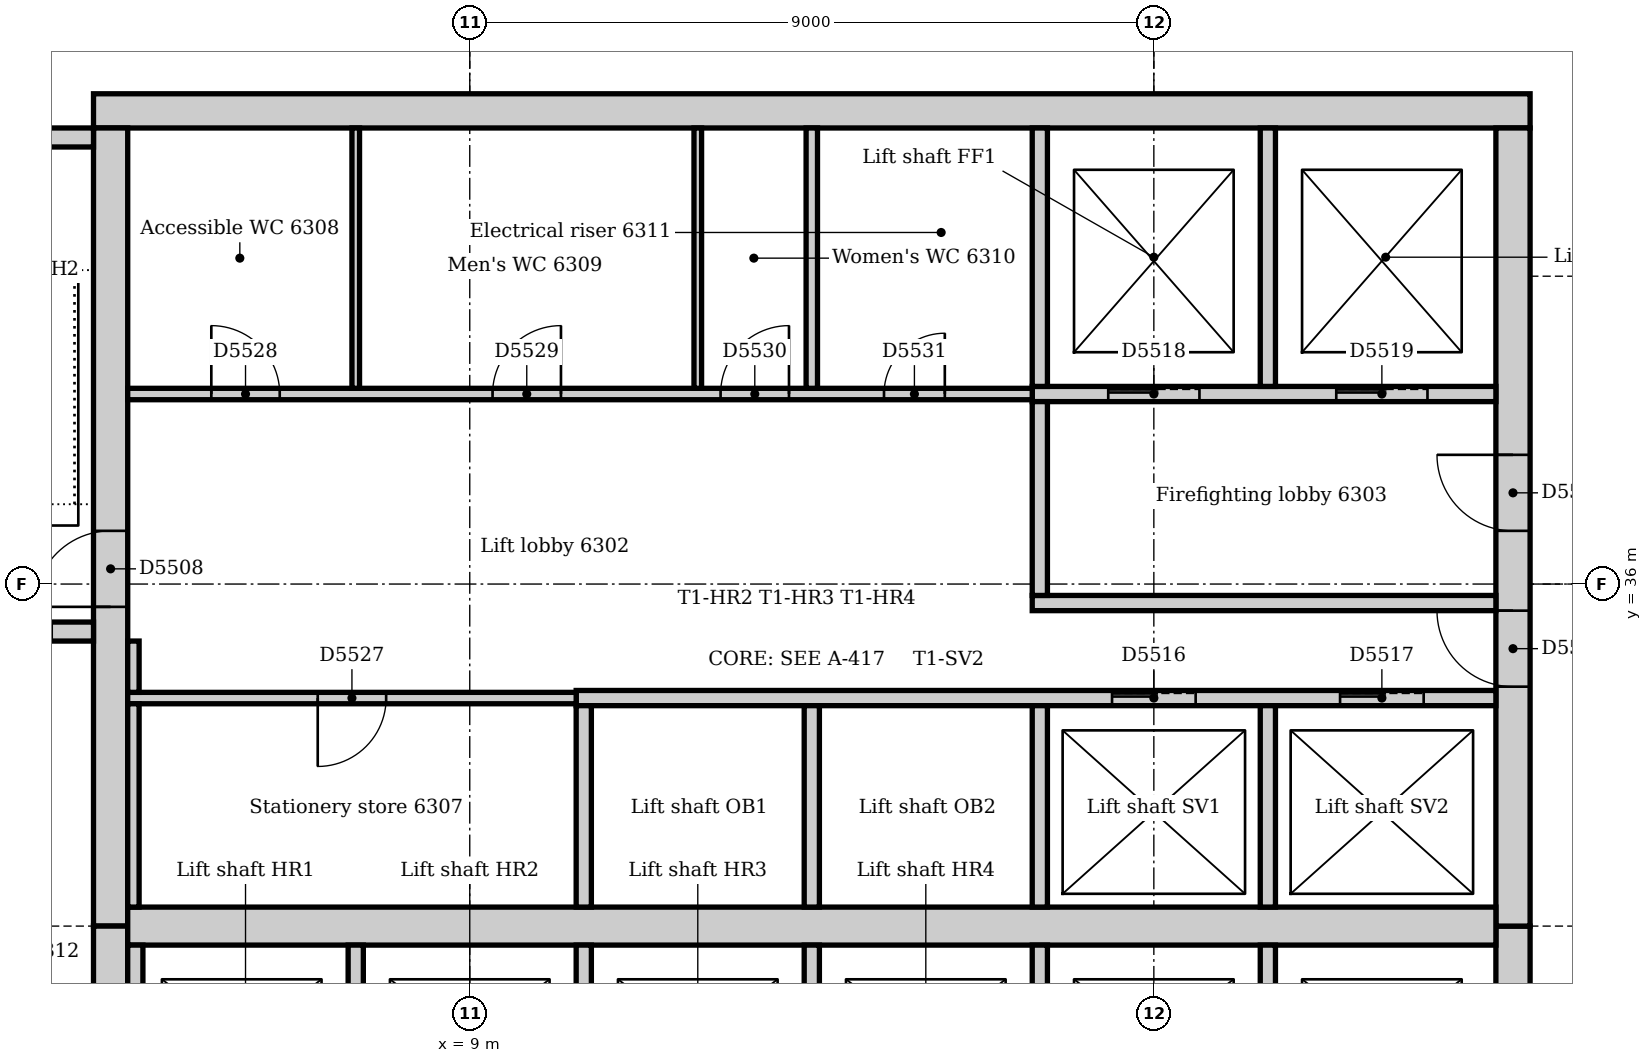
"""IFC4 building model, lengths in metres.
Left out: names, types, materials, properties, quantities, classifications, styles, units other than length and angle.
Written with IfcOpenShell. Run it as: python <this file> out.ifc"""

import sys

from ifc_helpers import new_model, si_unit, direction, frame, frame_2d, origin, place, context, subcontext, project, spatial, rectangle, extrude, element, fill, save


model = new_model("IFC4")
c1 = context("Model", 3, precision=1e-05, world=origin(), true_north=direction((0.0, 1.0)))
c2 = subcontext(c1, "Body", "Model", "MODEL_VIEW")
j1 = project(units=[si_unit("LENGTHUNIT", "METRE"), si_unit("PLANEANGLEUNIT", "RADIAN")], contexts=[c1])
p1 = place(None, origin())
s1 = spatial("IfcSite", under=j1, at=p1, CompositionType="ELEMENT")
p2 = place(p1, origin())
s2 = spatial("IfcBuilding", under=s1, at=p2, CompositionType="ELEMENT")
p3 = place(p2, frame((0.0, 0.0, 263.0)))
s3 = spatial("IfcBuildingStorey", under=s2, at=p3, CompositionType="ELEMENT", Elevation=263.0)
p4 = place(p3, frame((22.95, 42.225, 0.0), z_axis=(0.0, 0.0, 1.0), x_axis=(-1.0, 0.0, 0.0)))
e1 = element("IfcWall", 1, at=p4, inside=s3, PredefinedType="SOLIDWALL", context=c2, shape_type="SweptSolid", body=[
    extrude(rectangle(XDim=18.9, YDim=0.45, at=frame_2d((9.45, 0.0))), origin(), (0.0, 0.0, 1.0), 4.0),
])
p5 = place(p3, frame((22.725, 21.0, 0.0), z_axis=(0.0, 0.0, 1.0), x_axis=(0.0, 1.0, 0.0)))
e2 = element("IfcWall", 2, at=p5, inside=s3, PredefinedType="SOLIDWALL", context=c2, shape_type="SweptSolid", body=[
    extrude(rectangle(XDim=10.5, YDim=0.45, at=frame_2d((5.25, 0.0))), origin(), (0.0, 0.0, 1.0), 4.0),
])
p6 = place(p5, frame((4.35, 0.0, 0.0)))
e3 = element("IfcOpeningElement", 3, at=p6, cuts=e2, PredefinedType="OPENING", context=c2, shape_type="SweptSolid", body=[
    extrude(rectangle(XDim=1.8, YDim=2.1, at=frame_2d((0.9, 1.05))), frame((0.0, 0.235, 0.0), z_axis=(0.0, -1.0, 0.0), x_axis=(1.0, 0.0, 0.0)), (0.0, 0.0, 1.0), 0.47),
])
p7 = place(p3, frame((22.725, 31.5, 0.0), z_axis=(0.0, 0.0, 1.0), x_axis=(0.0, 1.0, 0.0)))
e4 = element("IfcWall", 4, at=p7, inside=s3, PredefinedType="SOLIDWALL", context=c2, shape_type="SweptSolid", body=[
    extrude(rectangle(XDim=10.5, YDim=0.45, at=frame_2d((5.25, 0.0))), origin(), (0.0, 0.0, 1.0), 4.0),
])
p8 = place(p7, frame((3.15, 0.0, 0.0)))
e5 = element("IfcOpeningElement", 5, at=p8, cuts=e4, PredefinedType="OPENING", context=c2, shape_type="SweptSolid", body=[
    extrude(rectangle(XDim=1.0, YDim=2.1, at=frame_2d((0.5, 1.05))), frame((0.0, 0.235, 0.0), z_axis=(0.0, -1.0, 0.0), x_axis=(1.0, 0.0, 0.0)), (0.0, 0.0, 1.0), 0.47),
])
p9 = place(p7, frame((5.2, 0.0, 0.0)))
e6 = element("IfcOpeningElement", 6, at=p9, cuts=e4, PredefinedType="OPENING", context=c2, shape_type="SweptSolid", body=[
    extrude(rectangle(XDim=1.0, YDim=2.1, at=frame_2d((0.5, 1.05))), frame((0.0, 0.235, 0.0), z_axis=(0.0, -1.0, 0.0), x_axis=(1.0, 0.0, 0.0)), (0.0, 0.0, 1.0), 0.47),
])
p10 = place(p3, frame((4.275, 42.0, 0.0), z_axis=(0.0, 0.0, 1.0), x_axis=(0.0, -1.0, 0.0)))
e7 = element("IfcWall", 7, at=p10, inside=s3, PredefinedType="SOLIDWALL", context=c2, shape_type="SweptSolid", body=[
    extrude(rectangle(XDim=10.5, YDim=0.45, at=frame_2d((5.25, 0.0))), origin(), (0.0, 0.0, 1.0), 4.0),
])
p11 = place(p10, frame((5.3, 0.0, 0.0)))
e8 = element("IfcOpeningElement", 8, at=p11, cuts=e7, PredefinedType="OPENING", context=c2, shape_type="SweptSolid", body=[
    extrude(rectangle(XDim=1.0, YDim=2.1, at=frame_2d((0.5, 1.05))), frame((0.0, 0.235, 0.0), z_axis=(0.0, -1.0, 0.0), x_axis=(1.0, 0.0, 0.0)), (0.0, 0.0, 1.0), 0.47),
])
p12 = place(p3, frame((4.275, 31.5, 0.0), z_axis=(0.0, 0.0, 1.0), x_axis=(0.0, -1.0, 0.0)))
e9 = element("IfcWall", 9, at=p12, inside=s3, PredefinedType="SOLIDWALL", context=c2, shape_type="SweptSolid", body=[
    extrude(rectangle(XDim=10.5, YDim=0.45, at=frame_2d((5.25, 0.0))), origin(), (0.0, 0.0, 1.0), 4.0),
])
p13 = place(p12, frame((4.25, 0.0, 0.0)))
e10 = element("IfcOpeningElement", 10, at=p13, cuts=e9, PredefinedType="OPENING", context=c2, shape_type="SweptSolid", body=[
    extrude(rectangle(XDim=1.0, YDim=2.1, at=frame_2d((0.5, 1.05))), frame((0.0, 0.235, 0.0), z_axis=(0.0, -1.0, 0.0), x_axis=(1.0, 0.0, 0.0)), (0.0, 0.0, 1.0), 0.47),
])
p14 = place(p3, frame((4.5, 31.5, 0.0), z_axis=(0.0, 0.0, 1.0), x_axis=(1.0, 0.0, 0.0)))
e11 = element("IfcWall", 11, at=p14, inside=s3, PredefinedType="SOLIDWALL", context=c2, shape_type="SweptSolid", body=[
    extrude(rectangle(XDim=18.0, YDim=0.5, at=frame_2d((9.0, 0.0))), origin(), (0.0, 0.0, 1.0), 4.0),
])
p15 = place(p3, frame((0.36, 35.375, 0.0), z_axis=(0.0, 0.0, 1.0), x_axis=(1.0, 0.0, 0.0)))
e12 = element("IfcWall", 12, at=p15, inside=s3, PredefinedType="SOLIDWALL", context=c2, shape_type="SweptSolid", body=[
    extrude(rectangle(XDim=3.69, YDim=0.25, at=frame_2d((1.845, 0.0))), origin(), (0.0, 0.0, 1.0), 4.0),
])
p16 = place(p15, frame((2.14, 0.0, 0.0)))
e13 = element("IfcOpeningElement", 13, at=p16, cuts=e12, PredefinedType="OPENING", context=c2, shape_type="SweptSolid", body=[
    extrude(rectangle(XDim=1.0, YDim=2.1, at=frame_2d((0.5, 1.05))), frame((0.0, 0.135, 0.0), z_axis=(0.0, -1.0, 0.0), x_axis=(1.0, 0.0, 0.0)), (0.0, 0.0, 1.0), 0.27),
])
p17 = place(p3, frame((4.05, 41.875, 0.0), z_axis=(0.0, 0.0, 1.0), x_axis=(-1.0, 0.0, 0.0)))
e14 = element("IfcWall", 14, at=p17, inside=s3, PredefinedType="SOLIDWALL", context=c2, shape_type="SweptSolid", body=[
    extrude(rectangle(XDim=3.69, YDim=0.25, at=frame_2d((1.845, 0.0))), origin(), (0.0, 0.0, 1.0), 4.0),
])
p18 = place(p3, frame((16.4, 35.75, 0.0), z_axis=(0.0, 0.0, 1.0), x_axis=(1.0, 0.0, 0.0)))
e15 = element("IfcWall", 15, at=p18, inside=s3, PredefinedType="PARTITIONING", context=c2, shape_type="SweptSolid", body=[
    extrude(rectangle(XDim=6.1, YDim=0.2, at=frame_2d((3.05, 0.0))), origin(), (0.0, 0.0, 1.0), 3.85),
])
p19 = place(p3, frame((16.4, 38.5, 0.0), z_axis=(0.0, 0.0, 1.0), x_axis=(1.0, 0.0, 0.0)))
e16 = element("IfcWall", 16, at=p19, inside=s3, PredefinedType="PARTITIONING", context=c2, shape_type="SweptSolid", body=[
    extrude(rectangle(XDim=6.1, YDim=0.2, at=frame_2d((3.05, 0.0))), origin(), (0.0, 0.0, 1.0), 3.85),
])
p20 = place(p19, frame((1.0, 0.0, 0.0)))
e17 = element("IfcOpeningElement", 17, at=p20, cuts=e16, PredefinedType="OPENING", context=c2, shape_type="SweptSolid", body=[
    extrude(rectangle(XDim=1.2, YDim=2.1, at=frame_2d((0.6, 1.05))), frame((0.0, 0.11, 0.0), z_axis=(0.0, -1.0, 0.0), x_axis=(1.0, 0.0, 0.0)), (0.0, 0.0, 1.0), 0.22),
])
p21 = place(p19, frame((4.0, 0.0, 0.0)))
e18 = element("IfcOpeningElement", 18, at=p21, cuts=e16, PredefinedType="OPENING", context=c2, shape_type="SweptSolid", body=[
    extrude(rectangle(XDim=1.2, YDim=2.1, at=frame_2d((0.6, 1.05))), frame((0.0, 0.11, 0.0), z_axis=(0.0, -1.0, 0.0), x_axis=(1.0, 0.0, 0.0)), (0.0, 0.0, 1.0), 0.22),
])
p22 = place(p3, frame((16.5, 35.85, 0.0), z_axis=(0.0, 0.0, 1.0), x_axis=(0.0, 1.0, 0.0)))
e19 = element("IfcWall", 19, at=p22, inside=s3, PredefinedType="PARTITIONING", context=c2, shape_type="SweptSolid", body=[
    extrude(rectangle(XDim=2.55, YDim=0.2, at=frame_2d((1.275, 0.0))), origin(), (0.0, 0.0, 1.0), 3.85),
])
p23 = place(p3, frame((10.4, 34.5, 0.0), z_axis=(0.0, 0.0, 1.0), x_axis=(1.0, 0.0, 0.0)))
e20 = element("IfcWall", 20, at=p23, inside=s3, PredefinedType="PARTITIONING", context=c2, shape_type="SweptSolid", body=[
    extrude(rectangle(XDim=12.1, YDim=0.2, at=frame_2d((6.05, 0.0))), origin(), (0.0, 0.0, 1.0), 3.85),
])
p24 = place(p23, frame((7.05, 0.0, 0.0)))
e21 = element("IfcOpeningElement", 21, at=p24, cuts=e20, PredefinedType="OPENING", context=c2, shape_type="SweptSolid", body=[
    extrude(rectangle(XDim=1.1, YDim=2.1, at=frame_2d((0.55, 1.05))), frame((0.0, 0.11, 0.0), z_axis=(0.0, -1.0, 0.0), x_axis=(1.0, 0.0, 0.0)), (0.0, 0.0, 1.0), 0.22),
])
p25 = place(p23, frame((10.05, 0.0, 0.0)))
e22 = element("IfcOpeningElement", 22, at=p25, cuts=e20, PredefinedType="OPENING", context=c2, shape_type="SweptSolid", body=[
    extrude(rectangle(XDim=1.1, YDim=2.1, at=frame_2d((0.55, 1.05))), frame((0.0, 0.11, 0.0), z_axis=(0.0, -1.0, 0.0), x_axis=(1.0, 0.0, 0.0)), (0.0, 0.0, 1.0), 0.22),
])
for number, where, z_axis, x_axis in (
    (23, (10.5, 28.6, 0.0), (0.0, 0.0, 1.0), (0.0, 1.0, 0.0)),
    (24, (10.5, 31.75, 0.0), (0.0, 0.0, 1.0), (0.0, 1.0, 0.0)),
    (25, (13.5, 28.6, 0.0), (0.0, 0.0, 1.0), (0.0, 1.0, 0.0)),
    (26, (13.5, 31.75, 0.0), (0.0, 0.0, 1.0), (0.0, 1.0, 0.0)),
    (27, (16.5, 28.6, 0.0), (0.0, 0.0, 1.0), (0.0, 1.0, 0.0)),
    (28, (16.5, 31.75, 0.0), (0.0, 0.0, 1.0), (0.0, 1.0, 0.0)),
    (29, (19.5, 28.6, 0.0), (0.0, 0.0, 1.0), (0.0, 1.0, 0.0)),
    (30, (19.5, 31.75, 0.0), (0.0, 0.0, 1.0), (0.0, 1.0, 0.0)),
):
    element("IfcWall", number, at=place(p3, frame(where, z_axis=z_axis, x_axis=x_axis)), inside=s3, PredefinedType="PARTITIONING", context=c2, shape_type="SweptSolid", body=[
        extrude(rectangle(XDim=2.65, YDim=0.2, at=frame_2d((1.325, 0.0))), origin(), (0.0, 0.0, 1.0), 3.85),
    ])
for number, where, z_axis, x_axis in (
    (31, (16.5, 38.6, 0.0), (0.0, 0.0, 1.0), (0.0, 1.0, 0.0)),
    (32, (19.5, 38.6, 0.0), (0.0, 0.0, 1.0), (0.0, 1.0, 0.0)),
):
    element("IfcWall", number, at=place(p3, frame(where, z_axis=z_axis, x_axis=x_axis)), inside=s3, PredefinedType="PARTITIONING", context=c2, shape_type="SweptSolid", body=[
        extrude(rectangle(XDim=3.4, YDim=0.2, at=frame_2d((1.7, 0.0))), origin(), (0.0, 0.0, 1.0), 3.85),
    ])
for number, where, z_axis, x_axis in (
    (33, (4.6, 28.6, 0.0), (0.0, 0.0, 1.0), (0.0, 1.0, 0.0)),
    (34, (7.5, 28.6, 0.0), (0.0, 0.0, 1.0), (0.0, 1.0, 0.0)),
):
    element("IfcWall", number, at=place(p3, frame(where, z_axis=z_axis, x_axis=x_axis)), inside=s3, PredefinedType="PARTITIONING", context=c2, shape_type="SweptSolid", body=[
        extrude(rectangle(XDim=2.65, YDim=0.2, at=frame_2d((1.325, 0.0))), origin(), (0.0, 0.0, 1.0), 3.85),
    ])
p26 = place(p3, frame((4.5, 38.5, 0.0), z_axis=(0.0, 0.0, 1.0), x_axis=(1.0, 0.0, 0.0)))
e35 = element("IfcWall", 35, at=p26, inside=s3, PredefinedType="PARTITIONING", context=c2, shape_type="SweptSolid", body=[
    extrude(rectangle(XDim=11.9, YDim=0.15, at=frame_2d((5.95, 0.0))), origin(), (0.0, 0.0, 1.0), 3.85),
])
p27 = place(p26, frame((1.1, 0.0, 0.0)))
e36 = element("IfcOpeningElement", 36, at=p27, cuts=e35, PredefinedType="OPENING", context=c2, shape_type="SweptSolid", body=[
    extrude(rectangle(XDim=0.9, YDim=2.1, at=frame_2d((0.45, 1.05))), frame((0.0, 0.085, 0.0), z_axis=(0.0, -1.0, 0.0), x_axis=(1.0, 0.0, 0.0)), (0.0, 0.0, 1.0), 0.17),
])
p28 = place(p26, frame((4.8, 0.0, 0.0)))
e37 = element("IfcOpeningElement", 37, at=p28, cuts=e35, PredefinedType="OPENING", context=c2, shape_type="SweptSolid", body=[
    extrude(rectangle(XDim=0.9, YDim=2.1, at=frame_2d((0.45, 1.05))), frame((0.0, 0.085, 0.0), z_axis=(0.0, -1.0, 0.0), x_axis=(1.0, 0.0, 0.0)), (0.0, 0.0, 1.0), 0.17),
])
p29 = place(p26, frame((7.8, 0.0, 0.0)))
e38 = element("IfcOpeningElement", 38, at=p29, cuts=e35, PredefinedType="OPENING", context=c2, shape_type="SweptSolid", body=[
    extrude(rectangle(XDim=0.9, YDim=2.1, at=frame_2d((0.45, 1.05))), frame((0.0, 0.085, 0.0), z_axis=(0.0, -1.0, 0.0), x_axis=(1.0, 0.0, 0.0)), (0.0, 0.0, 1.0), 0.17),
])
p30 = place(p26, frame((9.95, 0.0, 0.0)))
e39 = element("IfcOpeningElement", 39, at=p30, cuts=e35, PredefinedType="OPENING", context=c2, shape_type="SweptSolid", body=[
    extrude(rectangle(XDim=0.8, YDim=2.1, at=frame_2d((0.4, 1.05))), frame((0.0, 0.085, 0.0), z_axis=(0.0, -1.0, 0.0), x_axis=(1.0, 0.0, 0.0)), (0.0, 0.0, 1.0), 0.17),
])
p31 = place(p3, frame((4.5, 34.5, 0.0), z_axis=(0.0, 0.0, 1.0), x_axis=(1.0, 0.0, 0.0)))
e40 = element("IfcWall", 40, at=p31, inside=s3, PredefinedType="PARTITIONING", context=c2, shape_type="SweptSolid", body=[
    extrude(rectangle(XDim=5.9, YDim=0.15, at=frame_2d((2.95, 0.0))), origin(), (0.0, 0.0, 1.0), 3.85),
])
p32 = place(p31, frame((2.5, 0.0, 0.0)))
e41 = element("IfcOpeningElement", 41, at=p32, cuts=e40, PredefinedType="OPENING", context=c2, shape_type="SweptSolid", body=[
    extrude(rectangle(XDim=0.9, YDim=2.1, at=frame_2d((0.45, 1.05))), frame((0.0, 0.085, 0.0), z_axis=(0.0, -1.0, 0.0), x_axis=(1.0, 0.0, 0.0)), (0.0, 0.0, 1.0), 0.17),
])
p33 = place(p3, frame((4.575, 34.575, 0.0), z_axis=(0.0, 0.0, 1.0), x_axis=(0.0, 1.0, 0.0)))
e42 = element("IfcWall", 42, at=p33, inside=s3, PredefinedType="PARTITIONING", context=c2, shape_type="SweptSolid", body=[
    extrude(rectangle(XDim=0.675, YDim=0.15, at=frame_2d((0.338, 0.0))), origin(), (0.0, 0.0, 1.0), 3.85),
])
p34 = place(p3, frame((4.575, 31.75, 0.0), z_axis=(0.0, 0.0, 1.0), x_axis=(0.0, 1.0, 0.0)))
e43 = element("IfcWall", 43, at=p34, inside=s3, PredefinedType="PARTITIONING", context=c2, shape_type="SweptSolid", body=[
    extrude(rectangle(XDim=2.675, YDim=0.15, at=frame_2d((1.337, 0.0))), origin(), (0.0, 0.0, 1.0), 3.85),
])
p35 = place(p3, frame((13.5, 38.575, 0.0), z_axis=(0.0, 0.0, 1.0), x_axis=(0.0, 1.0, 0.0)))
e44 = element("IfcWall", 44, at=p35, inside=s3, PredefinedType="PARTITIONING", context=c2, shape_type="SweptSolid", body=[
    extrude(rectangle(XDim=3.425, YDim=0.15, at=frame_2d((1.712, 0.0))), origin(), (0.0, 0.0, 1.0), 3.85),
])
for number, where, z_axis, x_axis in (
    (45, (7.5, 38.575, 0.0), (0.0, 0.0, 1.0), (0.0, 1.0, 0.0)),
    (46, (12.0, 38.575, 0.0), (0.0, 0.0, 1.0), (0.0, 1.0, 0.0)),
):
    element("IfcWall", number, at=place(p3, frame(where, z_axis=z_axis, x_axis=x_axis)), inside=s3, PredefinedType="PARTITIONING", context=c2, shape_type="SweptSolid", body=[
        extrude(rectangle(XDim=3.425, YDim=0.1, at=frame_2d((1.712, 0.0))), origin(), (0.0, 0.0, 1.0), 3.85),
    ])
p36 = place(p11, frame((1.0, 0.0, 0.0), z_axis=(0.0, 0.0, 1.0), x_axis=(-1.0, 0.0, 0.0)))
e47 = element("IfcDoor", 47, at=p36, inside=s3, OperationType="SINGLE_SWING_LEFT", PredefinedType="DOOR", context=c2, shape_type="SweptSolid", body=[
    extrude(rectangle(XDim=1.0, YDim=2.1, at=frame_2d((0.5, 1.05))), frame((0.0, 0.025, 0.0), z_axis=(0.0, -1.0, 0.0), x_axis=(1.0, 0.0, 0.0)), (0.0, 0.0, 1.0), 0.05),
])
fill(e8, e47)
p37 = place(p24, origin())
e48 = element("IfcDoor", 48, at=p37, inside=s3, OperationType="SLIDING_TO_LEFT", PredefinedType="DOOR", context=c2, shape_type="SweptSolid", body=[
    extrude(rectangle(XDim=1.1, YDim=2.1, at=frame_2d((0.55, 1.05))), frame((0.0, 0.025, 0.0), z_axis=(0.0, -1.0, 0.0), x_axis=(1.0, 0.0, 0.0)), (0.0, 0.0, 1.0), 0.05),
])
fill(e21, e48)
p38 = place(p25, origin())
e49 = element("IfcDoor", 49, at=p38, inside=s3, OperationType="SLIDING_TO_LEFT", PredefinedType="DOOR", context=c2, shape_type="SweptSolid", body=[
    extrude(rectangle(XDim=1.1, YDim=2.1, at=frame_2d((0.55, 1.05))), frame((0.0, 0.025, 0.0), z_axis=(0.0, -1.0, 0.0), x_axis=(1.0, 0.0, 0.0)), (0.0, 0.0, 1.0), 0.05),
])
fill(e22, e49)
p39 = place(p20, origin())
e50 = element("IfcDoor", 50, at=p39, inside=s3, OperationType="SLIDING_TO_LEFT", PredefinedType="DOOR", context=c2, shape_type="SweptSolid", body=[
    extrude(rectangle(XDim=1.2, YDim=2.1, at=frame_2d((0.6, 1.05))), frame((0.0, 0.025, 0.0), z_axis=(0.0, -1.0, 0.0), x_axis=(1.0, 0.0, 0.0)), (0.0, 0.0, 1.0), 0.05),
])
fill(e17, e50)
p40 = place(p21, origin())
e51 = element("IfcDoor", 51, at=p40, inside=s3, OperationType="SLIDING_TO_LEFT", PredefinedType="DOOR", context=c2, shape_type="SweptSolid", body=[
    extrude(rectangle(XDim=1.2, YDim=2.1, at=frame_2d((0.6, 1.05))), frame((0.0, 0.025, 0.0), z_axis=(0.0, -1.0, 0.0), x_axis=(1.0, 0.0, 0.0)), (0.0, 0.0, 1.0), 0.05),
])
fill(e18, e51)
p41 = place(p8, origin())
e52 = element("IfcDoor", 52, at=p41, inside=s3, OperationType="SINGLE_SWING_RIGHT", PredefinedType="DOOR", context=c2, shape_type="SweptSolid", body=[
    extrude(rectangle(XDim=1.0, YDim=2.1, at=frame_2d((0.5, 1.05))), frame((0.0, 0.025, 0.0), z_axis=(0.0, -1.0, 0.0), x_axis=(1.0, 0.0, 0.0)), (0.0, 0.0, 1.0), 0.05),
])
fill(e5, e52)
p42 = place(p9, origin())
e53 = element("IfcDoor", 53, at=p42, inside=s3, OperationType="SINGLE_SWING_RIGHT", PredefinedType="DOOR", context=c2, shape_type="SweptSolid", body=[
    extrude(rectangle(XDim=1.0, YDim=2.1, at=frame_2d((0.5, 1.05))), frame((0.0, 0.025, 0.0), z_axis=(0.0, -1.0, 0.0), x_axis=(1.0, 0.0, 0.0)), (0.0, 0.0, 1.0), 0.05),
])
fill(e6, e53)
p43 = place(p32, frame((0.9, 0.0, 0.0), z_axis=(0.0, 0.0, 1.0), x_axis=(-1.0, 0.0, 0.0)))
e54 = element("IfcDoor", 54, at=p43, inside=s3, OperationType="SINGLE_SWING_RIGHT", PredefinedType="DOOR", context=c2, shape_type="SweptSolid", body=[
    extrude(rectangle(XDim=0.9, YDim=2.1, at=frame_2d((0.45, 1.05))), frame((0.0, 0.025, 0.0), z_axis=(0.0, -1.0, 0.0), x_axis=(1.0, 0.0, 0.0)), (0.0, 0.0, 1.0), 0.05),
])
fill(e41, e54)
p44 = place(p27, origin())
e55 = element("IfcDoor", 55, at=p44, inside=s3, OperationType="SINGLE_SWING_LEFT", PredefinedType="DOOR", context=c2, shape_type="SweptSolid", body=[
    extrude(rectangle(XDim=0.9, YDim=2.1, at=frame_2d((0.45, 1.05))), frame((0.0, 0.025, 0.0), z_axis=(0.0, -1.0, 0.0), x_axis=(1.0, 0.0, 0.0)), (0.0, 0.0, 1.0), 0.05),
])
fill(e36, e55)
p45 = place(p28, origin())
e56 = element("IfcDoor", 56, at=p45, inside=s3, OperationType="SINGLE_SWING_RIGHT", PredefinedType="DOOR", context=c2, shape_type="SweptSolid", body=[
    extrude(rectangle(XDim=0.9, YDim=2.1, at=frame_2d((0.45, 1.05))), frame((0.0, 0.025, 0.0), z_axis=(0.0, -1.0, 0.0), x_axis=(1.0, 0.0, 0.0)), (0.0, 0.0, 1.0), 0.05),
])
fill(e37, e56)
p46 = place(p29, origin())
e57 = element("IfcDoor", 57, at=p46, inside=s3, OperationType="SINGLE_SWING_RIGHT", PredefinedType="DOOR", context=c2, shape_type="SweptSolid", body=[
    extrude(rectangle(XDim=0.9, YDim=2.1, at=frame_2d((0.45, 1.05))), frame((0.0, 0.025, 0.0), z_axis=(0.0, -1.0, 0.0), x_axis=(1.0, 0.0, 0.0)), (0.0, 0.0, 1.0), 0.05),
])
fill(e38, e57)
p47 = place(p30, origin())
e58 = element("IfcDoor", 58, at=p47, inside=s3, OperationType="SINGLE_SWING_RIGHT", PredefinedType="DOOR", context=c2, shape_type="SweptSolid", body=[
    extrude(rectangle(XDim=0.8, YDim=2.1, at=frame_2d((0.4, 1.05))), frame((0.0, 0.025, 0.0), z_axis=(0.0, -1.0, 0.0), x_axis=(1.0, 0.0, 0.0)), (0.0, 0.0, 1.0), 0.05),
])
fill(e39, e58)
save(model, sys.argv[1])
